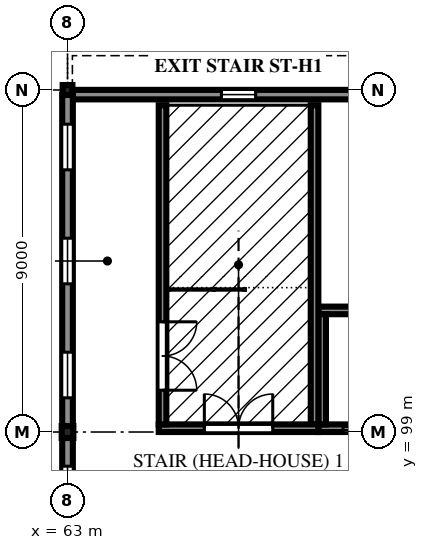
"""IFC4 building model, lengths in metres.
Left out: names, types, materials, properties, quantities, classifications, styles, units other than length and angle.
Written with IfcOpenShell. Run it as: python <this file> out.ifc"""

import sys

from ifc_helpers import new_model, si_unit, direction, frame, frame_2d, origin, origin_2d, place, context, subcontext, project, spatial, polyline, rectangle, i_section, outline, extrude, element, fill, save


model = new_model("IFC4")
c1 = context("Model", 3, precision=1e-05, world=origin(), true_north=direction((0.0, 1.0)))
c2 = subcontext(c1, "Body", "Model", "MODEL_VIEW")
j1 = project(units=[si_unit("LENGTHUNIT", "METRE"), si_unit("PLANEANGLEUNIT", "RADIAN")], contexts=[c1])
p1 = place(None, origin())
s1 = spatial("IfcSite", under=j1, at=p1, CompositionType="ELEMENT")
p2 = place(p1, origin())
s2 = spatial("IfcBuilding", under=s1, at=p2, CompositionType="ELEMENT")
p3 = place(p2, frame((0.0, 0.0, 7.5)))
s3 = spatial("IfcBuildingStorey", under=s2, at=p3, CompositionType="ELEMENT", Elevation=7.5)
p4 = place(p3, frame((63.0, 99.0, 0.0), z_axis=(0.0, 0.0, 1.0), x_axis=(1.0, 0.0, 0.0)))
e1 = element("IfcColumn", 1, at=p4, inside=s3, PredefinedType="COLUMN", context=c2, shape_type="SweptSolid", body=[
    extrude(i_section(OverallWidth=0.307, OverallDepth=0.314, WebThickness=0.012, FlangeThickness=0.019, FilletRadius=0.015, at=origin_2d()), origin(), (0.0, 0.0, 1.0), 4.2),
])
p5 = place(p3, frame((63.0, 108.0, 0.0), z_axis=(0.0, 0.0, 1.0), x_axis=(1.0, 0.0, 0.0)))
e2 = element("IfcColumn", 2, at=p5, inside=s3, PredefinedType="COLUMN", context=c2, shape_type="SweptSolid", body=[
    extrude(i_section(OverallWidth=0.256, OverallDepth=0.26, WebThickness=0.01, FlangeThickness=0.017, FilletRadius=0.013, at=origin_2d()), origin(), (0.0, 0.0, 1.0), 4.2),
])
p6 = place(p3, frame((63.0, 90.157, 0.0), z_axis=(0.0, 0.0, 1.0), x_axis=(0.0, 1.0, 0.0)))
e3 = element("IfcWall", 3, at=p6, inside=s3, PredefinedType="SOLIDWALL", context=c2, shape_type="SweptSolid", body=[
    extrude(rectangle(XDim=8.686, YDim=0.28, at=frame_2d((4.343, 0.0))), origin(), (0.0, 0.0, 1.0), 3.517),
])
p7 = place(p6, frame((0.743, 0.0, 0.9)))
e4 = element("IfcOpeningElement", 4, at=p7, cuts=e3, PredefinedType="OPENING", context=c2, shape_type="SweptSolid", body=[
    extrude(rectangle(XDim=1.2, YDim=2.4, at=frame_2d((0.6, 1.2))), frame((0.0, 0.15, 0.0), z_axis=(0.0, -1.0, 0.0), x_axis=(1.0, 0.0, 0.0)), (0.0, 0.0, 1.0), 0.3),
])
p8 = place(p6, frame((3.743, 0.0, 0.9)))
e5 = element("IfcOpeningElement", 5, at=p8, cuts=e3, PredefinedType="OPENING", context=c2, shape_type="SweptSolid", body=[
    extrude(rectangle(XDim=1.2, YDim=2.4, at=frame_2d((0.6, 1.2))), frame((0.0, 0.15, 0.0), z_axis=(0.0, -1.0, 0.0), x_axis=(1.0, 0.0, 0.0)), (0.0, 0.0, 1.0), 0.3),
])
p9 = place(p6, frame((6.743, 0.0, 0.9)))
e6 = element("IfcOpeningElement", 6, at=p9, cuts=e3, PredefinedType="OPENING", context=c2, shape_type="SweptSolid", body=[
    extrude(rectangle(XDim=1.2, YDim=2.4, at=frame_2d((0.6, 1.2))), frame((0.0, 0.15, 0.0), z_axis=(0.0, -1.0, 0.0), x_axis=(1.0, 0.0, 0.0)), (0.0, 0.0, 1.0), 0.3),
])
p10 = place(p3, frame((63.0, 99.157, 0.0), z_axis=(0.0, 0.0, 1.0), x_axis=(0.0, 1.0, 0.0)))
e7 = element("IfcWall", 7, at=p10, inside=s3, PredefinedType="SOLIDWALL", context=c2, shape_type="SweptSolid", body=[
    extrude(rectangle(XDim=8.713, YDim=0.28, at=frame_2d((4.356, 0.0))), origin(), (0.0, 0.0, 1.0), 3.517),
])
p11 = place(p10, frame((0.743, 0.0, 0.9)))
e8 = element("IfcOpeningElement", 8, at=p11, cuts=e7, PredefinedType="OPENING", context=c2, shape_type="SweptSolid", body=[
    extrude(rectangle(XDim=1.2, YDim=2.4, at=frame_2d((0.6, 1.2))), frame((0.0, 0.15, 0.0), z_axis=(0.0, -1.0, 0.0), x_axis=(1.0, 0.0, 0.0)), (0.0, 0.0, 1.0), 0.3),
])
p12 = place(p10, frame((3.743, 0.0, 0.9)))
e9 = element("IfcOpeningElement", 9, at=p12, cuts=e7, PredefinedType="OPENING", context=c2, shape_type="SweptSolid", body=[
    extrude(rectangle(XDim=1.2, YDim=2.4, at=frame_2d((0.6, 1.2))), frame((0.0, 0.15, 0.0), z_axis=(0.0, -1.0, 0.0), x_axis=(1.0, 0.0, 0.0)), (0.0, 0.0, 1.0), 0.3),
])
p13 = place(p10, frame((6.743, 0.0, 0.9)))
e10 = element("IfcOpeningElement", 10, at=p13, cuts=e7, PredefinedType="OPENING", context=c2, shape_type="SweptSolid", body=[
    extrude(rectangle(XDim=1.2, YDim=2.4, at=frame_2d((0.6, 1.2))), frame((0.0, 0.15, 0.0), z_axis=(0.0, -1.0, 0.0), x_axis=(1.0, 0.0, 0.0)), (0.0, 0.0, 1.0), 0.3),
])
p14 = place(p3, frame((63.128, 107.878, 0.0), z_axis=(0.0, 0.0, 1.0), x_axis=(1.0, 0.0, 0.0)))
e11 = element("IfcWall", 11, at=p14, inside=s3, PredefinedType="SOLIDWALL", context=c2, shape_type="SweptSolid", body=[
    extrude(rectangle(XDim=8.744, YDim=0.25, at=frame_2d((4.372, 0.0))), origin(), (0.0, 0.0, 1.0), 4.05),
])
p15 = place(p14, frame((3.922, 0.0, 1.2)))
e12 = element("IfcOpeningElement", 12, at=p15, cuts=e11, PredefinedType="OPENING", context=c2, shape_type="SweptSolid", body=[
    extrude(rectangle(XDim=0.9, YDim=1.8, at=frame_2d((0.45, 0.9))), frame((0.0, 0.135, 0.0), z_axis=(0.0, -1.0, 0.0), x_axis=(1.0, 0.0, 0.0)), (0.0, 0.0, 1.0), 0.27),
])
p16 = place(p3, frame((65.4, 99.1, -0.13), z_axis=(0.0, 0.0, 1.0), x_axis=(1.0, 0.0, 0.0)))
e13 = element("IfcWall", 13, at=p16, inside=s3, PredefinedType="SOLIDWALL", context=c2, shape_type="SweptSolid", body=[
    extrude(rectangle(XDim=4.2, YDim=0.2, at=frame_2d((2.1, 0.0))), origin(), (0.0, 0.0, 1.0), 3.72),
])
p17 = place(p16, frame((1.2, 0.0, 0.13)))
e14 = element("IfcOpeningElement", 14, at=p17, cuts=e13, PredefinedType="OPENING", context=c2, shape_type="SweptSolid", body=[
    extrude(rectangle(XDim=1.8, YDim=2.1, at=frame_2d((0.9, 1.05))), frame((0.0, 0.11, 0.0), z_axis=(0.0, -1.0, 0.0), x_axis=(1.0, 0.0, 0.0)), (0.0, 0.0, 1.0), 0.22),
])
p18 = place(p3, frame((65.5, 99.2, -0.13), z_axis=(0.0, 0.0, 1.0), x_axis=(0.0, 1.0, 0.0)))
e15 = element("IfcWall", 15, at=p18, inside=s3, PredefinedType="SOLIDWALL", context=c2, shape_type="SweptSolid", body=[
    extrude(rectangle(XDim=8.4, YDim=0.2, at=frame_2d((4.2, 0.0))), origin(), (0.0, 0.0, 1.0), 3.72),
])
p19 = place(p18, frame((0.9, 0.0, 0.13)))
e16 = element("IfcOpeningElement", 16, at=p19, cuts=e15, PredefinedType="OPENING", context=c2, shape_type="SweptSolid", body=[
    extrude(rectangle(XDim=1.8, YDim=2.1, at=frame_2d((0.9, 1.05))), frame((0.0, 0.11, 0.0), z_axis=(0.0, -1.0, 0.0), x_axis=(1.0, 0.0, 0.0)), (0.0, 0.0, 1.0), 0.22),
])
p20 = place(p3, frame((69.5, 99.2, -0.13), z_axis=(0.0, 0.0, 1.0), x_axis=(0.0, 1.0, 0.0)))
e17 = element("IfcWall", 17, at=p20, inside=s3, PredefinedType="SOLIDWALL", context=c2, shape_type="SweptSolid", body=[
    extrude(rectangle(XDim=8.4, YDim=0.2, at=frame_2d((4.2, 0.0))), origin(), (0.0, 0.0, 1.0), 3.72),
])
p21 = place(p3, frame((69.602, 99.1, 0.0), z_axis=(0.0, 0.0, 1.0), x_axis=(1.0, 0.0, 0.0)))
e18 = element("IfcWall", 18, at=p21, inside=s3, PredefinedType="SOLIDWALL", context=c2, shape_type="SweptSolid", body=[
    extrude(rectangle(XDim=2.398, YDim=0.2, at=frame_2d((1.199, 0.0))), origin(), (0.0, 0.0, 1.0), 3.516),
])
p22 = place(p21, frame((0.648, 0.0, 0.0)))
e19 = element("IfcOpeningElement", 19, at=p22, cuts=e18, PredefinedType="OPENING", context=c2, shape_type="SweptSolid", body=[
    extrude(rectangle(XDim=1.1, YDim=2.1, at=frame_2d((0.55, 1.05))), frame((0.0, 0.11, 0.0), z_axis=(0.0, -1.0, 0.0), x_axis=(1.0, 0.0, 0.0)), (0.0, 0.0, 1.0), 0.22),
])
p23 = place(p3, frame((69.602, 102.2, 0.0), z_axis=(0.0, 0.0, 1.0), x_axis=(1.0, 0.0, 0.0)))
e20 = element("IfcWall", 20, at=p23, inside=s3, PredefinedType="SOLIDWALL", context=c2, shape_type="SweptSolid", body=[
    extrude(rectangle(XDim=2.398, YDim=0.2, at=frame_2d((1.199, 0.0))), origin(), (0.0, 0.0, 1.0), 3.516),
])
p24 = place(p3, frame((69.7, 99.2, 0.0), z_axis=(0.0, 0.0, 1.0), x_axis=(0.0, 1.0, 0.0)))
e21 = element("IfcWall", 21, at=p24, inside=s3, PredefinedType="SOLIDWALL", context=c2, shape_type="SweptSolid", body=[
    extrude(rectangle(XDim=2.9, YDim=0.2, at=frame_2d((1.45, 0.0))), origin(), (0.0, 0.0, 1.0), 3.516),
])
p25 = place(p9, origin())
e22 = element("IfcWindow", 22, at=p25, inside=s3, PartitioningType="DOUBLE_PANEL_HORIZONTAL", PredefinedType="WINDOW", context=c2, shape_type="SweptSolid", body=[
    extrude(outline(polyline([(0.0, 0.0), (1.2, 0.0), (1.2, 2.4), (0.0, 2.4), (0.0, 0.0)]), holes=[polyline([(0.07, 0.07), (1.13, 0.07), (1.13, 2.33), (0.07, 2.33), (0.07, 0.07)])]), frame((0.0, 0.03, 0.0), z_axis=(0.0, -1.0, 0.0), x_axis=(1.0, 0.0, 0.0)), (0.0, 0.0, 1.0), 0.06),
    extrude(rectangle(XDim=1.06, YDim=0.04, at=frame_2d((0.6, 1.2))), frame((0.0, 0.021, 0.0), z_axis=(0.0, -1.0, 0.0), x_axis=(1.0, 0.0, 0.0)), (0.0, 0.0, 1.0), 0.043),
    extrude(outline(polyline([(0.07, 0.07), (1.13, 0.07), (1.13, 1.18), (0.07, 1.18), (0.07, 0.07)]), holes=[polyline([(0.1, 0.1), (1.1, 0.1), (1.1, 1.15), (0.1, 1.15), (0.1, 0.1)])]), frame((0.0, 0.022, 0.0), z_axis=(0.0, -1.0, 0.0), x_axis=(1.0, 0.0, 0.0)), (0.0, 0.0, 1.0), 0.045),
    extrude(rectangle(XDim=1.0, YDim=1.05, at=frame_2d((0.6, 0.625))), frame((0.0, 0.006, 0.0), z_axis=(0.0, -1.0, 0.0), x_axis=(1.0, 0.0, 0.0)), (0.0, 0.0, 1.0), 0.012),
    extrude(outline(polyline([(0.07, 1.22), (1.13, 1.22), (1.13, 2.33), (0.07, 2.33), (0.07, 1.22)]), holes=[polyline([(0.1, 1.25), (1.1, 1.25), (1.1, 2.3), (0.1, 2.3), (0.1, 1.25)])]), frame((0.0, 0.022, 0.0), z_axis=(0.0, -1.0, 0.0), x_axis=(1.0, 0.0, 0.0)), (0.0, 0.0, 1.0), 0.045),
    extrude(rectangle(XDim=1.0, YDim=1.05, at=frame_2d((0.6, 1.775))), frame((0.0, 0.006, 0.0), z_axis=(0.0, -1.0, 0.0), x_axis=(1.0, 0.0, 0.0)), (0.0, 0.0, 1.0), 0.012),
])
fill(e6, e22)
p26 = place(p11, origin())
e23 = element("IfcWindow", 23, at=p26, inside=s3, PartitioningType="DOUBLE_PANEL_HORIZONTAL", PredefinedType="WINDOW", context=c2, shape_type="SweptSolid", body=[
    extrude(outline(polyline([(0.0, 0.0), (1.2, 0.0), (1.2, 2.4), (0.0, 2.4), (0.0, 0.0)]), holes=[polyline([(0.07, 0.07), (1.13, 0.07), (1.13, 2.33), (0.07, 2.33), (0.07, 0.07)])]), frame((0.0, 0.03, 0.0), z_axis=(0.0, -1.0, 0.0), x_axis=(1.0, 0.0, 0.0)), (0.0, 0.0, 1.0), 0.06),
    extrude(rectangle(XDim=1.06, YDim=0.04, at=frame_2d((0.6, 1.2))), frame((0.0, 0.021, 0.0), z_axis=(0.0, -1.0, 0.0), x_axis=(1.0, 0.0, 0.0)), (0.0, 0.0, 1.0), 0.043),
    extrude(outline(polyline([(0.07, 0.07), (1.13, 0.07), (1.13, 1.18), (0.07, 1.18), (0.07, 0.07)]), holes=[polyline([(0.1, 0.1), (1.1, 0.1), (1.1, 1.15), (0.1, 1.15), (0.1, 0.1)])]), frame((0.0, 0.022, 0.0), z_axis=(0.0, -1.0, 0.0), x_axis=(1.0, 0.0, 0.0)), (0.0, 0.0, 1.0), 0.045),
    extrude(rectangle(XDim=1.0, YDim=1.05, at=frame_2d((0.6, 0.625))), frame((0.0, 0.006, 0.0), z_axis=(0.0, -1.0, 0.0), x_axis=(1.0, 0.0, 0.0)), (0.0, 0.0, 1.0), 0.012),
    extrude(outline(polyline([(0.07, 1.22), (1.13, 1.22), (1.13, 2.33), (0.07, 2.33), (0.07, 1.22)]), holes=[polyline([(0.1, 1.25), (1.1, 1.25), (1.1, 2.3), (0.1, 2.3), (0.1, 1.25)])]), frame((0.0, 0.022, 0.0), z_axis=(0.0, -1.0, 0.0), x_axis=(1.0, 0.0, 0.0)), (0.0, 0.0, 1.0), 0.045),
    extrude(rectangle(XDim=1.0, YDim=1.05, at=frame_2d((0.6, 1.775))), frame((0.0, 0.006, 0.0), z_axis=(0.0, -1.0, 0.0), x_axis=(1.0, 0.0, 0.0)), (0.0, 0.0, 1.0), 0.012),
])
fill(e8, e23)
p27 = place(p12, origin())
e24 = element("IfcWindow", 24, at=p27, inside=s3, PartitioningType="DOUBLE_PANEL_HORIZONTAL", PredefinedType="WINDOW", context=c2, shape_type="SweptSolid", body=[
    extrude(outline(polyline([(0.0, 0.0), (1.2, 0.0), (1.2, 2.4), (0.0, 2.4), (0.0, 0.0)]), holes=[polyline([(0.07, 0.07), (1.13, 0.07), (1.13, 2.33), (0.07, 2.33), (0.07, 0.07)])]), frame((0.0, 0.03, 0.0), z_axis=(0.0, -1.0, 0.0), x_axis=(1.0, 0.0, 0.0)), (0.0, 0.0, 1.0), 0.06),
    extrude(rectangle(XDim=1.06, YDim=0.04, at=frame_2d((0.6, 1.2))), frame((0.0, 0.021, 0.0), z_axis=(0.0, -1.0, 0.0), x_axis=(1.0, 0.0, 0.0)), (0.0, 0.0, 1.0), 0.043),
    extrude(outline(polyline([(0.07, 0.07), (1.13, 0.07), (1.13, 1.18), (0.07, 1.18), (0.07, 0.07)]), holes=[polyline([(0.1, 0.1), (1.1, 0.1), (1.1, 1.15), (0.1, 1.15), (0.1, 0.1)])]), frame((0.0, 0.022, 0.0), z_axis=(0.0, -1.0, 0.0), x_axis=(1.0, 0.0, 0.0)), (0.0, 0.0, 1.0), 0.045),
    extrude(rectangle(XDim=1.0, YDim=1.05, at=frame_2d((0.6, 0.625))), frame((0.0, 0.006, 0.0), z_axis=(0.0, -1.0, 0.0), x_axis=(1.0, 0.0, 0.0)), (0.0, 0.0, 1.0), 0.012),
    extrude(outline(polyline([(0.07, 1.22), (1.13, 1.22), (1.13, 2.33), (0.07, 2.33), (0.07, 1.22)]), holes=[polyline([(0.1, 1.25), (1.1, 1.25), (1.1, 2.3), (0.1, 2.3), (0.1, 1.25)])]), frame((0.0, 0.022, 0.0), z_axis=(0.0, -1.0, 0.0), x_axis=(1.0, 0.0, 0.0)), (0.0, 0.0, 1.0), 0.045),
    extrude(rectangle(XDim=1.0, YDim=1.05, at=frame_2d((0.6, 1.775))), frame((0.0, 0.006, 0.0), z_axis=(0.0, -1.0, 0.0), x_axis=(1.0, 0.0, 0.0)), (0.0, 0.0, 1.0), 0.012),
])
fill(e9, e24)
p28 = place(p13, origin())
e25 = element("IfcWindow", 25, at=p28, inside=s3, PartitioningType="DOUBLE_PANEL_HORIZONTAL", PredefinedType="WINDOW", context=c2, shape_type="SweptSolid", body=[
    extrude(outline(polyline([(0.0, 0.0), (1.2, 0.0), (1.2, 2.4), (0.0, 2.4), (0.0, 0.0)]), holes=[polyline([(0.07, 0.07), (1.13, 0.07), (1.13, 2.33), (0.07, 2.33), (0.07, 0.07)])]), frame((0.0, 0.03, 0.0), z_axis=(0.0, -1.0, 0.0), x_axis=(1.0, 0.0, 0.0)), (0.0, 0.0, 1.0), 0.06),
    extrude(rectangle(XDim=1.06, YDim=0.04, at=frame_2d((0.6, 1.2))), frame((0.0, 0.021, 0.0), z_axis=(0.0, -1.0, 0.0), x_axis=(1.0, 0.0, 0.0)), (0.0, 0.0, 1.0), 0.043),
    extrude(outline(polyline([(0.07, 0.07), (1.13, 0.07), (1.13, 1.18), (0.07, 1.18), (0.07, 0.07)]), holes=[polyline([(0.1, 0.1), (1.1, 0.1), (1.1, 1.15), (0.1, 1.15), (0.1, 0.1)])]), frame((0.0, 0.022, 0.0), z_axis=(0.0, -1.0, 0.0), x_axis=(1.0, 0.0, 0.0)), (0.0, 0.0, 1.0), 0.045),
    extrude(rectangle(XDim=1.0, YDim=1.05, at=frame_2d((0.6, 0.625))), frame((0.0, 0.006, 0.0), z_axis=(0.0, -1.0, 0.0), x_axis=(1.0, 0.0, 0.0)), (0.0, 0.0, 1.0), 0.012),
    extrude(outline(polyline([(0.07, 1.22), (1.13, 1.22), (1.13, 2.33), (0.07, 2.33), (0.07, 1.22)]), holes=[polyline([(0.1, 1.25), (1.1, 1.25), (1.1, 2.3), (0.1, 2.3), (0.1, 1.25)])]), frame((0.0, 0.022, 0.0), z_axis=(0.0, -1.0, 0.0), x_axis=(1.0, 0.0, 0.0)), (0.0, 0.0, 1.0), 0.045),
    extrude(rectangle(XDim=1.0, YDim=1.05, at=frame_2d((0.6, 1.775))), frame((0.0, 0.006, 0.0), z_axis=(0.0, -1.0, 0.0), x_axis=(1.0, 0.0, 0.0)), (0.0, 0.0, 1.0), 0.012),
])
fill(e10, e25)
p29 = place(p15, origin())
e26 = element("IfcWindow", 26, at=p29, inside=s3, PartitioningType="SINGLE_PANEL", PredefinedType="WINDOW", context=c2, shape_type="SweptSolid", body=[
    extrude(outline(polyline([(0.0, 0.0), (0.9, 0.0), (0.9, 1.8), (0.0, 1.8), (0.0, 0.0)]), holes=[polyline([(0.07, 0.07), (0.83, 0.07), (0.83, 1.73), (0.07, 1.73), (0.07, 0.07)])]), frame((0.0, 0.03, 0.0), z_axis=(0.0, -1.0, 0.0), x_axis=(1.0, 0.0, 0.0)), (0.0, 0.0, 1.0), 0.06),
    extrude(outline(polyline([(0.07, 0.07), (0.83, 0.07), (0.83, 1.73), (0.07, 1.73), (0.07, 0.07)]), holes=[polyline([(0.1, 0.1), (0.8, 0.1), (0.8, 1.7), (0.1, 1.7), (0.1, 0.1)])]), frame((0.0, 0.022, 0.0), z_axis=(0.0, -1.0, 0.0), x_axis=(1.0, 0.0, 0.0)), (0.0, 0.0, 1.0), 0.045),
    extrude(rectangle(XDim=0.7, YDim=1.6, at=frame_2d((0.45, 0.9))), frame((0.0, 0.006, 0.0), z_axis=(0.0, -1.0, 0.0), x_axis=(1.0, 0.0, 0.0)), (0.0, 0.0, 1.0), 0.012),
])
fill(e12, e26)
p30 = place(p22, origin())
e27 = element("IfcDoor", 27, at=p30, inside=s3, OperationType="SLIDING_TO_LEFT", PredefinedType="DOOR", context=c2, shape_type="SweptSolid", body=[
    extrude(outline(polyline([(0.0, 0.0), (0.07, 0.0), (0.07, 2.03), (1.03, 2.03), (1.03, 0.0), (1.1, 0.0), (1.1, 2.1), (0.0, 2.1), (0.0, 0.0)])), frame((0.0, 0.025, 0.0), z_axis=(0.0, -1.0, 0.0), x_axis=(1.0, 0.0, 0.0)), (0.0, 0.0, 1.0), 0.05),
    extrude(rectangle(XDim=0.524, YDim=2.016, at=frame_2d((0.336, 1.018))), frame((0.0, 0.018, 0.0), z_axis=(0.0, -1.0, 0.0), x_axis=(1.0, 0.0, 0.0)), (0.0, 0.0, 1.0), 0.016),
    extrude(rectangle(XDim=0.52, YDim=2.016, at=frame_2d((0.766, 1.018))), frame((0.0, -0.002, 0.0), z_axis=(0.0, -1.0, 0.0), x_axis=(1.0, 0.0, 0.0)), (0.0, 0.0, 1.0), 0.016),
])
fill(e19, e27)
p31 = place(p19, frame((1.8, 0.0, 0.0), z_axis=(0.0, 0.0, 1.0), x_axis=(-1.0, 0.0, 0.0)))
e28 = element("IfcDoor", 28, at=p31, inside=s3, OperationType="DOUBLE_DOOR_SINGLE_SWING", PredefinedType="DOOR", context=c2, shape_type="SweptSolid", body=[
    extrude(outline(polyline([(0.0, 0.0), (0.07, 0.0), (0.07, 2.03), (1.73, 2.03), (1.73, 0.0), (1.8, 0.0), (1.8, 2.1), (0.0, 2.1), (0.0, 0.0)])), frame((0.0, 0.025, 0.0), z_axis=(0.0, -1.0, 0.0), x_axis=(1.0, 0.0, 0.0)), (0.0, 0.0, 1.0), 0.05),
    extrude(outline(polyline([(0.074, 0.01), (0.897, 0.01), (0.897, 2.026), (0.074, 2.026), (0.074, 0.01)]), holes=[polyline([(0.194, 0.16), (0.777, 0.16), (0.777, 1.01), (0.194, 1.01), (0.194, 0.16)]), polyline([(0.335, 1.16), (0.635, 1.16), (0.635, 1.76), (0.335, 1.76), (0.335, 1.16)])]), frame((0.0, 0.017, 0.0), z_axis=(0.0, -1.0, 0.0), x_axis=(1.0, 0.0, 0.0)), (0.0, 0.0, 1.0), 0.035),
    extrude(rectangle(XDim=0.583, YDim=0.85, at=frame_2d((0.485, 0.585))), frame((0.0, 0.009, 0.0), z_axis=(0.0, -1.0, 0.0), x_axis=(1.0, 0.0, 0.0)), (0.0, 0.0, 1.0), 0.017),
    extrude(rectangle(XDim=0.3, YDim=0.6, at=frame_2d((0.485, 1.46))), frame((0.0, 0.006, 0.0), z_axis=(0.0, -1.0, 0.0), x_axis=(1.0, 0.0, 0.0)), (0.0, 0.0, 1.0), 0.012),
    extrude(outline(polyline([(0.903, 0.01), (1.726, 0.01), (1.726, 2.026), (0.903, 2.026), (0.903, 0.01)]), holes=[polyline([(1.023, 0.16), (1.606, 0.16), (1.606, 1.01), (1.023, 1.01), (1.023, 0.16)]), polyline([(1.165, 1.16), (1.465, 1.16), (1.465, 1.76), (1.165, 1.76), (1.165, 1.16)])]), frame((0.0, 0.017, 0.0), z_axis=(0.0, -1.0, 0.0), x_axis=(1.0, 0.0, 0.0)), (0.0, 0.0, 1.0), 0.035),
    extrude(rectangle(XDim=0.583, YDim=0.85, at=frame_2d((1.314, 0.585))), frame((0.0, 0.009, 0.0), z_axis=(0.0, -1.0, 0.0), x_axis=(1.0, 0.0, 0.0)), (0.0, 0.0, 1.0), 0.017),
    extrude(rectangle(XDim=0.3, YDim=0.6, at=frame_2d((1.314, 1.46))), frame((0.0, 0.006, 0.0), z_axis=(0.0, -1.0, 0.0), x_axis=(1.0, 0.0, 0.0)), (0.0, 0.0, 1.0), 0.012),
])
fill(e16, e28)
p32 = place(p17, origin())
e29 = element("IfcDoor", 29, at=p32, inside=s3, OperationType="DOUBLE_DOOR_SINGLE_SWING", PredefinedType="DOOR", context=c2, shape_type="SweptSolid", body=[
    extrude(outline(polyline([(0.0, 0.0), (0.07, 0.0), (0.07, 2.03), (1.73, 2.03), (1.73, 0.0), (1.8, 0.0), (1.8, 2.1), (0.0, 2.1), (0.0, 0.0)])), frame((0.0, 0.025, 0.0), z_axis=(0.0, -1.0, 0.0), x_axis=(1.0, 0.0, 0.0)), (0.0, 0.0, 1.0), 0.05),
    extrude(outline(polyline([(0.074, 0.01), (0.897, 0.01), (0.897, 2.026), (0.074, 2.026), (0.074, 0.01)]), holes=[polyline([(0.194, 0.16), (0.777, 0.16), (0.777, 1.01), (0.194, 1.01), (0.194, 0.16)]), polyline([(0.335, 1.16), (0.635, 1.16), (0.635, 1.76), (0.335, 1.76), (0.335, 1.16)])]), frame((0.0, 0.017, 0.0), z_axis=(0.0, -1.0, 0.0), x_axis=(1.0, 0.0, 0.0)), (0.0, 0.0, 1.0), 0.035),
    extrude(rectangle(XDim=0.583, YDim=0.85, at=frame_2d((0.485, 0.585))), frame((0.0, 0.009, 0.0), z_axis=(0.0, -1.0, 0.0), x_axis=(1.0, 0.0, 0.0)), (0.0, 0.0, 1.0), 0.017),
    extrude(rectangle(XDim=0.3, YDim=0.6, at=frame_2d((0.485, 1.46))), frame((0.0, 0.006, 0.0), z_axis=(0.0, -1.0, 0.0), x_axis=(1.0, 0.0, 0.0)), (0.0, 0.0, 1.0), 0.012),
    extrude(outline(polyline([(0.903, 0.01), (1.726, 0.01), (1.726, 2.026), (0.903, 2.026), (0.903, 0.01)]), holes=[polyline([(1.023, 0.16), (1.606, 0.16), (1.606, 1.01), (1.023, 1.01), (1.023, 0.16)]), polyline([(1.165, 1.16), (1.465, 1.16), (1.465, 1.76), (1.165, 1.76), (1.165, 1.16)])]), frame((0.0, 0.017, 0.0), z_axis=(0.0, -1.0, 0.0), x_axis=(1.0, 0.0, 0.0)), (0.0, 0.0, 1.0), 0.035),
    extrude(rectangle(XDim=0.583, YDim=0.85, at=frame_2d((1.314, 0.585))), frame((0.0, 0.009, 0.0), z_axis=(0.0, -1.0, 0.0), x_axis=(1.0, 0.0, 0.0)), (0.0, 0.0, 1.0), 0.017),
    extrude(rectangle(XDim=0.3, YDim=0.6, at=frame_2d((1.314, 1.46))), frame((0.0, 0.006, 0.0), z_axis=(0.0, -1.0, 0.0), x_axis=(1.0, 0.0, 0.0)), (0.0, 0.0, 1.0), 0.012),
])
fill(e14, e29)
save(model, sys.argv[1])
